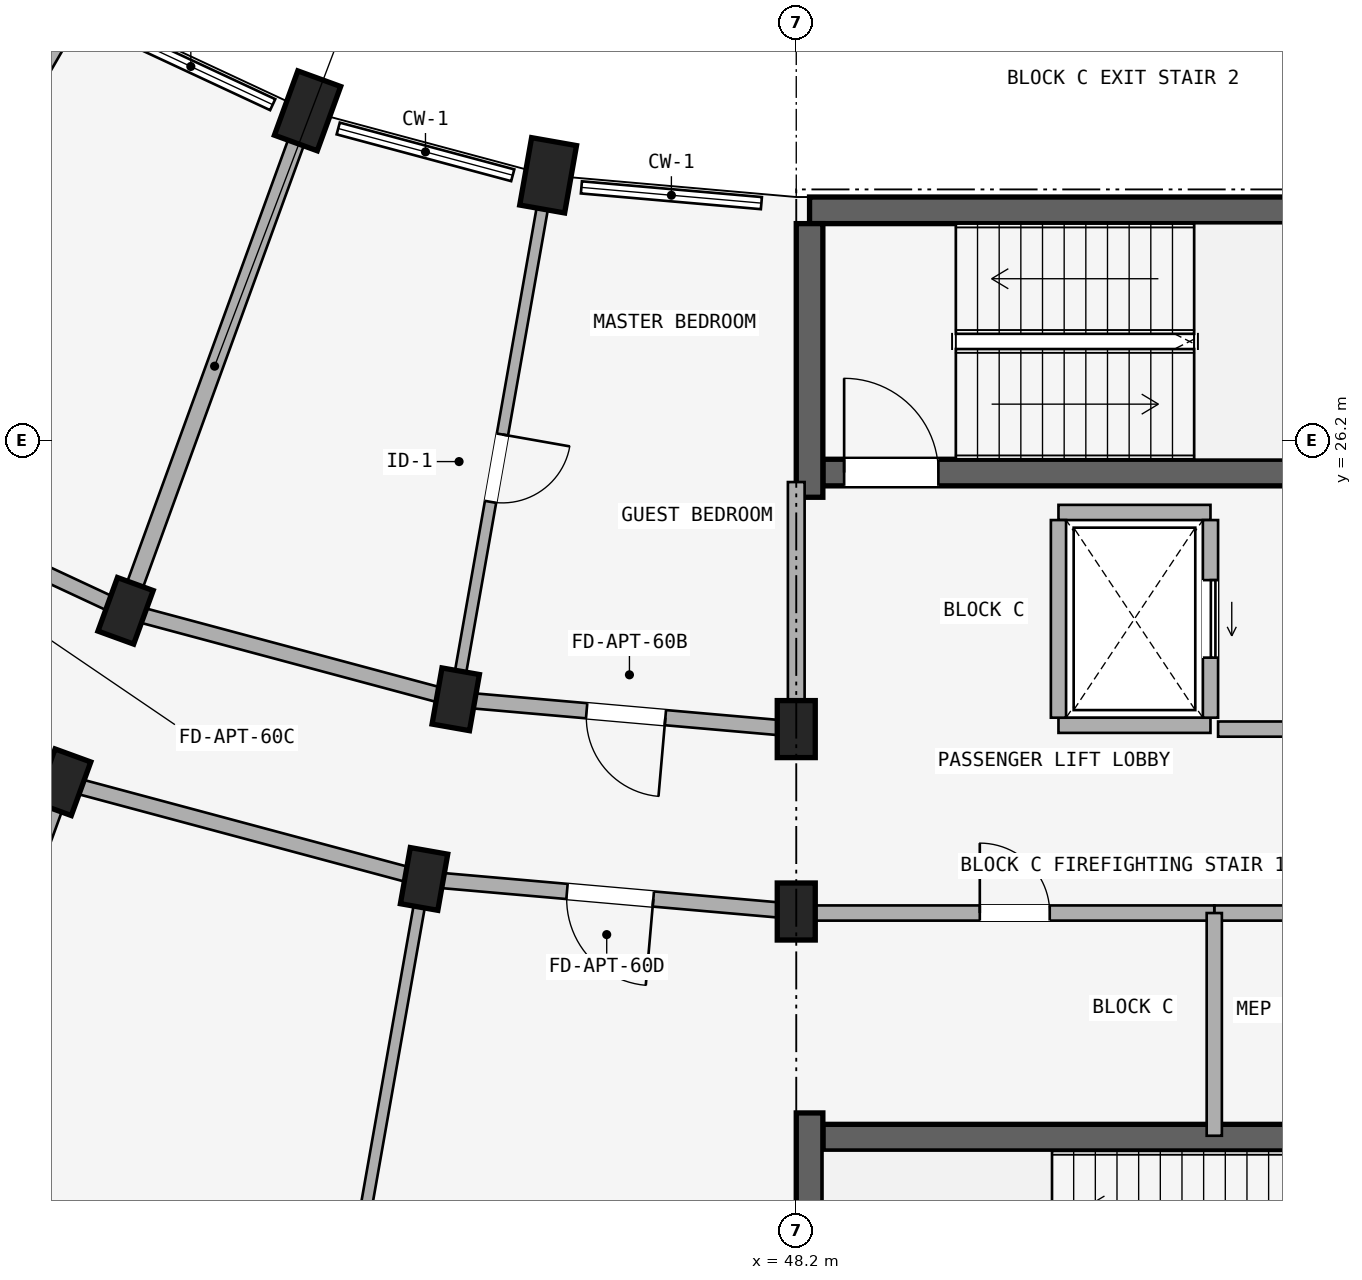
"""IFC4 building model, lengths in metres.
Left out: names, types, materials, properties, quantities, classifications, styles, units other than length and angle.
Written with IfcOpenShell. Run it as: python <this file> out.ifc"""

import sys

from ifc_helpers import new_model, si_unit, direction, frame, frame_2d, origin, origin_2d, place, context, subcontext, project, spatial, rectangle, extrude, element, fill, save


model = new_model("IFC4")
c1 = context("Model", 3, precision=1e-05, world=origin(), true_north=direction((0.0, 1.0)))
c2 = subcontext(c1, "Body", "Model", "MODEL_VIEW")
j1 = project(units=[si_unit("LENGTHUNIT", "METRE"), si_unit("PLANEANGLEUNIT", "RADIAN")], contexts=[c1])
p1 = place(None, origin())
s1 = spatial("IfcSite", under=j1, at=p1, CompositionType="ELEMENT")
p2 = place(p1, origin())
s2 = spatial("IfcBuilding", under=s1, at=p2, CompositionType="ELEMENT")
p3 = place(p2, frame((0.0, 0.0, 4.5)))
s3 = spatial("IfcBuildingStorey", under=s2, at=p3, CompositionType="ELEMENT", Elevation=4.5)
p4 = place(p3, frame((48.55, 17.025, 0.0), z_axis=(0.0, 0.0, 1.0), x_axis=(1.0, 0.0, 0.0)))
e1 = element("IfcWall", 1, at=p4, inside=s3, PredefinedType="SHEAR", context=c2, shape_type="SweptSolid", body=[
    extrude(rectangle(XDim=8.075, YDim=0.35, at=frame_2d((4.038, 0.0))), origin(), (0.0, 0.0, 1.0), 3.98),
])
p5 = place(p4, frame((6.38, 0.0, 0.0)))
e2 = element("IfcOpeningElement", 2, at=p5, cuts=e1, PredefinedType="OPENING", context=c2, shape_type="SweptSolid", body=[
    extrude(rectangle(XDim=1.24, YDim=2.15, at=frame_2d((0.62, 1.075))), frame((0.0, 0.185, 0.0), z_axis=(0.0, -1.0, 0.0), x_axis=(1.0, 0.0, 0.0)), (0.0, 0.0, 1.0), 0.37),
])
p6 = place(p3, frame((48.375, 17.35, 0.0), z_axis=(0.0, 0.0, 1.0), x_axis=(0.0, -1.0, 0.0)))
e3 = element("IfcWall", 3, at=p6, inside=s3, PredefinedType="SHEAR", context=c2, shape_type="SweptSolid", body=[
    extrude(rectangle(XDim=3.6, YDim=0.35, at=frame_2d((1.8, 0.0))), origin(), (0.0, 0.0, 1.0), 3.98),
])
p7 = place(p3, frame((48.375, 29.225, 0.0), z_axis=(0.0, 0.0, 1.0), x_axis=(1.0, 0.0, 0.0)))
e4 = element("IfcWall", 4, at=p7, inside=s3, PredefinedType="SHEAR", context=c2, shape_type="SweptSolid", body=[
    extrude(rectangle(XDim=8.25, YDim=0.35, at=frame_2d((4.125, 0.0))), origin(), (0.0, 0.0, 1.0), 3.98),
])
p8 = place(p3, frame((48.55, 25.775, 0.0), z_axis=(0.0, 0.0, 1.0), x_axis=(1.0, 0.0, 0.0)))
e5 = element("IfcWall", 5, at=p8, inside=s3, PredefinedType="SHEAR", context=c2, shape_type="SweptSolid", body=[
    extrude(rectangle(XDim=7.9, YDim=0.35, at=frame_2d((3.95, 0.0))), origin(), (0.0, 0.0, 1.0), 3.98),
])
p9 = place(p8, frame((0.28, 0.0, 0.0)))
e6 = element("IfcOpeningElement", 6, at=p9, cuts=e5, PredefinedType="OPENING", context=c2, shape_type="SweptSolid", body=[
    extrude(rectangle(XDim=1.24, YDim=2.15, at=frame_2d((0.62, 1.075))), frame((0.0, 0.185, 0.0), z_axis=(0.0, -1.0, 0.0), x_axis=(1.0, 0.0, 0.0)), (0.0, 0.0, 1.0), 0.37),
])
p10 = place(p3, frame((48.375, 29.05, 0.0), z_axis=(0.0, 0.0, 1.0), x_axis=(0.0, -1.0, 0.0)))
e7 = element("IfcWall", 7, at=p10, inside=s3, PredefinedType="SHEAR", context=c2, shape_type="SweptSolid", body=[
    extrude(rectangle(XDim=3.6, YDim=0.35, at=frame_2d((1.8, 0.0))), origin(), (0.0, 0.0, 1.0), 3.98),
])
for number, where, z_axis, x_axis in (
    (8, (48.2, 22.4, 0.0), (0.0, 0.0, 1.0), (1.0, 0.0, 0.0)),
    (9, (48.2, 20.0, 0.0), (0.0, 0.0, 1.0), (1.0, 0.0, 0.0)),
):
    element("IfcColumn", number, at=place(p3, frame(where, z_axis=z_axis, x_axis=x_axis)), inside=s3, PredefinedType="COLUMN", context=c2, shape_type="SweptSolid", body=[
        extrude(rectangle(XDim=0.5, YDim=0.75, at=origin_2d()), origin(), (0.0, 0.0, 1.0), 3.98),
    ])
p11 = place(p3, frame((44.935, 29.686, 0.0), z_axis=(0.0, 0.0, 1.0), x_axis=(-0.984807753012, 0.173648177667, 0.0)))
e10 = element("IfcColumn", 10, at=p11, inside=s3, PredefinedType="COLUMN", context=c2, shape_type="SweptSolid", body=[
    extrude(rectangle(XDim=0.6, YDim=0.9, at=origin_2d()), origin(), (0.0, 0.0, 1.0), 3.98),
])
for number, where, z_axis, x_axis in (
    (11, (43.72, 22.792, 0.0), (0.0, 0.0, 1.0), (-0.985, 0.174, 0.0)),
    (12, (43.303, 20.428, 0.0), (0.0, 0.0, 1.0), (-0.985, 0.174, 0.0)),
):
    element("IfcColumn", number, at=place(p3, frame(where, z_axis=z_axis, x_axis=x_axis)), inside=s3, PredefinedType="COLUMN", context=c2, shape_type="SweptSolid", body=[
        extrude(rectangle(XDim=0.5, YDim=0.75, at=origin_2d()), origin(), (0.0, 0.0, 1.0), 3.98),
    ])
p12 = place(p3, frame((41.77, 30.534, 0.0), z_axis=(0.0, 0.0, 1.0), x_axis=(-0.939692620786, 0.342020143326, 0.0)))
e13 = element("IfcColumn", 13, at=p12, inside=s3, PredefinedType="COLUMN", context=c2, shape_type="SweptSolid", body=[
    extrude(rectangle(XDim=0.6, YDim=0.9, at=origin_2d()), origin(), (0.0, 0.0, 1.0), 3.98),
])
for number, where, z_axis, x_axis in (
    (14, (39.376, 23.956, 0.0), (0.0, 0.0, 1.0), (-0.94, 0.342, 0.0)),
    (15, (38.555, 21.701, 0.0), (0.0, 0.0, 1.0), (-0.94, 0.342, 0.0)),
):
    element("IfcColumn", number, at=place(p3, frame(where, z_axis=z_axis, x_axis=x_axis)), inside=s3, PredefinedType="COLUMN", context=c2, shape_type="SweptSolid", body=[
        extrude(rectangle(XDim=0.5, YDim=0.75, at=origin_2d()), origin(), (0.0, 0.0, 1.0), 3.98),
    ])
p13 = place(p3, frame((53.7, 19.98, 0.0), z_axis=(0.0, 0.0, 1.0), x_axis=(1.0, 0.0, 0.0)))
e16 = element("IfcWall", 16, at=p13, inside=s3, PredefinedType="STANDARD", context=c2, shape_type="SweptSolid", body=[
    extrude(rectangle(XDim=5.65, YDim=0.2, at=frame_2d((2.825, 0.0))), origin(), (0.0, 0.0, 1.0), 3.322),
])
p14 = place(p13, frame((1.923, 0.0, 0.0)))
e17 = element("IfcOpeningElement", 17, at=p14, cuts=e16, PredefinedType="OPENING", context=c2, shape_type="SweptSolid", body=[
    extrude(rectangle(XDim=1.24, YDim=2.15, at=frame_2d((0.62, 1.075))), frame((0.0, 0.11, 0.0), z_axis=(0.0, -1.0, 0.0), x_axis=(1.0, 0.0, 0.0)), (0.0, 0.0, 1.0), 0.22),
])
p15 = place(p3, frame((48.45, 19.98, 0.0), z_axis=(0.0, 0.0, 1.0), x_axis=(1.0, 0.0, 0.0)))
e18 = element("IfcWall", 18, at=p15, inside=s3, PredefinedType="STANDARD", context=c2, shape_type="SweptSolid", body=[
    extrude(rectangle(XDim=5.25, YDim=0.2, at=frame_2d((2.625, 0.0))), origin(), (0.0, 0.0, 1.0), 3.322),
])
p16 = place(p15, frame((2.165, 0.0, 0.0)))
e19 = element("IfcOpeningElement", 19, at=p16, cuts=e18, PredefinedType="OPENING", context=c2, shape_type="SweptSolid", body=[
    extrude(rectangle(XDim=0.92, YDim=2.1, at=frame_2d((0.46, 1.05))), frame((0.0, 0.11, 0.0), z_axis=(0.0, -1.0, 0.0), x_axis=(1.0, 0.0, 0.0)), (0.0, 0.0, 1.0), 0.22),
])
p17 = place(p3, frame((53.7, 19.98, 0.0), z_axis=(0.0, 0.0, 1.0), x_axis=(0.0, -1.0, 0.0)))
e20 = element("IfcWall", 20, at=p17, inside=s3, PredefinedType="STANDARD", context=c2, shape_type="SweptSolid", body=[
    extrude(rectangle(XDim=2.93, YDim=0.2, at=frame_2d((1.465, 0.0))), origin(), (0.0, 0.0, 1.0), 3.322),
])
p18 = place(p3, frame((51.65, 25.25, 0.0), z_axis=(0.0, 0.0, 1.0), x_axis=(1.0, 0.0, 0.0)))
e21 = element("IfcWall", 21, at=p18, inside=s3, PredefinedType="STANDARD", context=c2, shape_type="SweptSolid", body=[
    extrude(rectangle(XDim=2.0, YDim=0.2, at=frame_2d((1.0, 0.0))), origin(), (0.0, 0.0, 1.0), 3.98),
])
p19 = place(p3, frame((51.65, 22.45, 0.0), z_axis=(0.0, 0.0, 1.0), x_axis=(1.0, 0.0, 0.0)))
e22 = element("IfcWall", 22, at=p19, inside=s3, PredefinedType="STANDARD", context=c2, shape_type="SweptSolid", body=[
    extrude(rectangle(XDim=2.0, YDim=0.2, at=frame_2d((1.0, 0.0))), origin(), (0.0, 0.0, 1.0), 3.322),
])
p20 = place(p3, frame((51.65, 25.15, 0.0), z_axis=(0.0, 0.0, 1.0), x_axis=(0.0, -1.0, 0.0)))
e23 = element("IfcWall", 23, at=p20, inside=s3, PredefinedType="STANDARD", context=c2, shape_type="SweptSolid", body=[
    extrude(rectangle(XDim=2.6, YDim=0.2, at=frame_2d((1.3, 0.0))), origin(), (0.0, 0.0, 1.0), 3.322),
])
p21 = place(p3, frame((53.65, 25.15, 0.0), z_axis=(0.0, 0.0, 1.0), x_axis=(0.0, -1.0, 0.0)))
e24 = element("IfcWall", 24, at=p21, inside=s3, PredefinedType="STANDARD", context=c2, shape_type="SweptSolid", body=[
    extrude(rectangle(XDim=2.6, YDim=0.2, at=frame_2d((1.3, 0.0))), origin(), (0.0, 0.0, 1.0), 3.322),
])
p22 = place(p21, frame((0.79, 0.0, 0.0)))
e25 = element("IfcOpeningElement", 25, at=p22, cuts=e24, PredefinedType="OPENING", context=c2, shape_type="SweptSolid", body=[
    extrude(rectangle(XDim=1.02, YDim=2.15, at=frame_2d((0.51, 1.075))), frame((0.0, 0.11, 0.0), z_axis=(0.0, -1.0, 0.0), x_axis=(1.0, 0.0, 0.0)), (0.0, 0.0, 1.0), 0.22),
])
p23 = place(p3, frame((53.75, 22.4, 0.0), z_axis=(0.0, 0.0, 1.0), x_axis=(1.0, 0.0, 0.0)))
e26 = element("IfcWall", 26, at=p23, inside=s3, PredefinedType="STANDARD", context=c2, shape_type="SweptSolid", body=[
    extrude(rectangle(XDim=5.6, YDim=0.2, at=frame_2d((2.8, 0.0))), origin(), (0.0, 0.0, 1.0), 3.322),
])
p24 = place(p23, frame((1.91, 0.0, 0.0)))
e27 = element("IfcOpeningElement", 27, at=p24, cuts=e26, PredefinedType="OPENING", context=c2, shape_type="SweptSolid", body=[
    extrude(rectangle(XDim=1.22, YDim=2.15, at=frame_2d((0.61, 1.075))), frame((0.0, 0.11, 0.0), z_axis=(0.0, -1.0, 0.0), x_axis=(1.0, 0.0, 0.0)), (0.0, 0.0, 1.0), 0.22),
])
p25 = place(p3, frame((48.2, 22.4, 0.0), z_axis=(0.0, 0.0, 1.0), x_axis=(-0.996191949488, 0.087187153726, 0.0)))
e28 = element("IfcWall", 28, at=p25, inside=s3, PredefinedType="STANDARD", context=c2, shape_type="SweptSolid", body=[
    extrude(rectangle(XDim=4.497, YDim=0.2, at=frame_2d((2.249, 0.0))), origin(), (0.0, 0.0, 1.0), 3.322),
])
p26 = place(p25, frame((1.729, 0.0, 0.0)))
e29 = element("IfcOpeningElement", 29, at=p26, cuts=e28, PredefinedType="OPENING", context=c2, shape_type="SweptSolid", body=[
    extrude(rectangle(XDim=1.04, YDim=2.15, at=frame_2d((0.52, 1.075))), frame((0.0, 0.11, 0.0), z_axis=(0.0, -1.0, 0.0), x_axis=(1.0, 0.0, 0.0)), (0.0, 0.0, 1.0), 0.22),
])
p27 = place(p3, frame((48.2, 20.0, 0.0), z_axis=(0.0, 0.0, 1.0), x_axis=(-0.996193663584, 0.087167566415, 0.0)))
e30 = element("IfcWall", 30, at=p27, inside=s3, PredefinedType="STANDARD", context=c2, shape_type="SweptSolid", body=[
    extrude(rectangle(XDim=4.916, YDim=0.2, at=frame_2d((2.458, 0.0))), origin(), (0.0, 0.0, 1.0), 3.322),
])
p28 = place(p27, frame((1.888, 0.0, 0.0)))
e31 = element("IfcOpeningElement", 31, at=p28, cuts=e30, PredefinedType="OPENING", context=c2, shape_type="SweptSolid", body=[
    extrude(rectangle(XDim=1.14, YDim=2.15, at=frame_2d((0.57, 1.075))), frame((0.0, 0.11, 0.0), z_axis=(0.0, -1.0, 0.0), x_axis=(1.0, 0.0, 0.0)), (0.0, 0.0, 1.0), 0.22),
])
p29 = place(p3, frame((43.72, 22.792, 0.0), z_axis=(0.0, 0.0, 1.0), x_axis=(-0.965934240054, 0.258787642463, 0.0)))
e32 = element("IfcWall", 32, at=p29, inside=s3, PredefinedType="STANDARD", context=c2, shape_type="SweptSolid", body=[
    extrude(rectangle(XDim=4.497, YDim=0.2, at=frame_2d((2.249, 0.0))), origin(), (0.0, 0.0, 1.0), 3.322),
])
p30 = place(p3, frame((43.303, 20.428, 0.0), z_axis=(0.0, 0.0, 1.0), x_axis=(-0.965930095386, 0.258803112091, 0.0)))
e33 = element("IfcWall", 33, at=p30, inside=s3, PredefinedType="STANDARD", context=c2, shape_type="SweptSolid", body=[
    extrude(rectangle(XDim=4.916, YDim=0.2, at=frame_2d((2.458, 0.0))), origin(), (0.0, 0.0, 1.0), 3.322),
])
p31 = place(p3, frame((39.376, 23.956, 0.0), z_axis=(0.0, 0.0, 1.0), x_axis=(-0.906307919131, 0.422617978463, 0.0)))
e34 = element("IfcWall", 34, at=p31, inside=s3, PredefinedType="STANDARD", context=c2, shape_type="SweptSolid", body=[
    extrude(rectangle(XDim=4.497, YDim=0.2, at=frame_2d((2.249, 0.0))), origin(), (0.0, 0.0, 1.0), 3.322),
])
p32 = place(p31, frame((1.709, 0.0, 0.0)))
e35 = element("IfcOpeningElement", 35, at=p32, cuts=e34, PredefinedType="OPENING", context=c2, shape_type="SweptSolid", body=[
    extrude(rectangle(XDim=1.08, YDim=2.15, at=frame_2d((0.54, 1.075))), frame((0.0, 0.11, 0.0), z_axis=(0.0, -1.0, 0.0), x_axis=(1.0, 0.0, 0.0)), (0.0, 0.0, 1.0), 0.22),
])
p33 = place(p3, frame((38.555, 21.701, 0.0), z_axis=(0.0, 0.0, 1.0), x_axis=(-0.906302381024, 0.422629854778, 0.0)))
e36 = element("IfcWall", 36, at=p33, inside=s3, PredefinedType="STANDARD", context=c2, shape_type="SweptSolid", body=[
    extrude(rectangle(XDim=4.915, YDim=0.2, at=frame_2d((2.458, 0.0))), origin(), (0.0, 0.0, 1.0), 3.322),
])
p34 = place(p33, frame((1.958, 0.0, 0.0)))
e37 = element("IfcOpeningElement", 37, at=p34, cuts=e36, PredefinedType="OPENING", context=c2, shape_type="SweptSolid", body=[
    extrude(rectangle(XDim=1.0, YDim=2.15, at=frame_2d((0.5, 1.075))), frame((0.0, 0.11, 0.0), z_axis=(0.0, -1.0, 0.0), x_axis=(1.0, 0.0, 0.0)), (0.0, 0.0, 1.0), 0.22),
])
p35 = place(p3, frame((48.2, 25.65, 0.0), z_axis=(0.0, 0.0, 1.0), x_axis=(0.0, -1.0, 0.0)))
e38 = element("IfcWall", 38, at=p35, inside=s3, PredefinedType="STANDARD", context=c2, shape_type="SweptSolid", body=[
    extrude(rectangle(XDim=3.2, YDim=0.22, at=frame_2d((1.6, 0.0))), origin(), (0.0, 0.0, 1.0), 3.322),
])
p36 = place(p3, frame((44.901, 29.489, 0.0), z_axis=(0.0, 0.0, 1.0), x_axis=(-0.173647089161, -0.984807944945, 0.0)))
e39 = element("IfcWall", 39, at=p36, inside=s3, PredefinedType="PARTITIONING", context=c2, shape_type="SweptSolid", body=[
    extrude(rectangle(XDim=6.75, YDim=0.15, at=frame_2d((3.375, 0.0))), origin(), (0.0, 0.0, 1.0), 3.322),
])
p37 = place(p36, frame((3.262, 0.0, 0.0)))
e40 = element("IfcOpeningElement", 40, at=p37, cuts=e39, PredefinedType="OPENING", context=c2, shape_type="SweptSolid", body=[
    extrude(rectangle(XDim=0.9, YDim=2.1, at=frame_2d((0.45, 1.05))), frame((0.0, 0.085, 0.0), z_axis=(0.0, -1.0, 0.0), x_axis=(1.0, 0.0, 0.0)), (0.0, 0.0, 1.0), 0.17),
])
p38 = place(p3, frame((43.286, 20.33, 0.0), z_axis=(0.0, 0.0, 1.0), x_axis=(-0.173646216546, -0.984808098809, 0.0)))
e41 = element("IfcWall", 41, at=p38, inside=s3, PredefinedType="PARTITIONING", context=c2, shape_type="SweptSolid", body=[
    extrude(rectangle(XDim=17.42, YDim=0.15, at=frame_2d((8.71, 0.0))), origin(), (0.0, 0.0, 1.0), 3.322),
])
p39 = place(p38, frame((7.5, 0.0, 0.0)))
e42 = element("IfcOpeningElement", 42, at=p39, cuts=e41, PredefinedType="OPENING", context=c2, shape_type="SweptSolid", body=[
    extrude(rectangle(XDim=0.8, YDim=2.1, at=frame_2d((0.4, 1.05))), frame((0.0, 0.085, 0.0), z_axis=(0.0, -1.0, 0.0), x_axis=(1.0, 0.0, 0.0)), (0.0, 0.0, 1.0), 0.17),
])
p40 = place(p3, frame((41.702, 30.346, 0.0), z_axis=(0.0, 0.0, 1.0), x_axis=(-0.342010221662, -0.939696231917, 0.0)))
e43 = element("IfcWall", 43, at=p40, inside=s3, PredefinedType="STANDARD", context=c2, shape_type="SweptSolid", body=[
    extrude(rectangle(XDim=6.75, YDim=0.22, at=frame_2d((3.375, 0.0))), origin(), (0.0, 0.0, 1.0), 3.322),
])
p41 = place(p3, frame((38.521, 21.607, 0.0), z_axis=(0.0, 0.0, 1.0), x_axis=(-0.342022120477, -0.939691901159, 0.0)))
e44 = element("IfcWall", 44, at=p41, inside=s3, PredefinedType="STANDARD", context=c2, shape_type="SweptSolid", body=[
    extrude(rectangle(XDim=17.42, YDim=0.23, at=frame_2d((8.71, 0.0))), origin(), (0.0, 0.0, 1.0), 3.322),
])
p42 = place(p3, frame((38.7, 31.746, 0.0), z_axis=(0.0, 0.0, 1.0), x_axis=(-0.499997969693, -0.866026575979, 0.0)))
e45 = element("IfcWall", 45, at=p42, inside=s3, PredefinedType="PARTITIONING", context=c2, shape_type="SweptSolid", body=[
    extrude(rectangle(XDim=6.75, YDim=0.15, at=frame_2d((3.375, 0.0))), origin(), (0.0, 0.0, 1.0), 3.322),
])
p43 = place(p42, frame((3.222, 0.0, 0.0)))
e46 = element("IfcOpeningElement", 46, at=p43, cuts=e45, PredefinedType="OPENING", context=c2, shape_type="SweptSolid", body=[
    extrude(rectangle(XDim=0.98, YDim=2.12, at=frame_2d((0.49, 1.06))), frame((0.0, 0.085, 0.0), z_axis=(0.0, -1.0, 0.0), x_axis=(1.0, 0.0, 0.0)), (0.0, 0.0, 1.0), 0.17),
])
p44 = place(p16, frame((0.92, 0.0, 0.0), z_axis=(0.0, 0.0, 1.0), x_axis=(-1.0, 0.0, 0.0)))
e47 = element("IfcDoor", 47, at=p44, inside=s3, OperationType="SINGLE_SWING_RIGHT", PredefinedType="DOOR", context=c2, shape_type="SweptSolid", body=[
    extrude(rectangle(XDim=0.92, YDim=2.1, at=frame_2d((0.46, 1.05))), frame((0.0, 0.025, 0.0), z_axis=(0.0, -1.0, 0.0), x_axis=(1.0, 0.0, 0.0)), (0.0, 0.0, 1.0), 0.05),
])
fill(e19, e47)
p45 = place(p9, origin())
e48 = element("IfcDoor", 48, at=p45, inside=s3, OperationType="SINGLE_SWING_LEFT", PredefinedType="DOOR", context=c2, shape_type="SweptSolid", body=[
    extrude(rectangle(XDim=1.24, YDim=2.15, at=frame_2d((0.62, 1.075))), frame((0.0, 0.025, 0.0), z_axis=(0.0, -1.0, 0.0), x_axis=(1.0, 0.0, 0.0)), (0.0, 0.0, 1.0), 0.05),
])
fill(e6, e48)
p46 = place(p22, origin())
e49 = element("IfcDoor", 49, at=p46, inside=s3, OperationType="SLIDING_TO_RIGHT", PredefinedType="DOOR", context=c2, shape_type="SweptSolid", body=[
    extrude(rectangle(XDim=1.02, YDim=2.15, at=frame_2d((0.51, 1.075))), frame((0.0, 0.025, 0.0), z_axis=(0.0, -1.0, 0.0), x_axis=(1.0, 0.0, 0.0)), (0.0, 0.0, 1.0), 0.05),
])
fill(e25, e49)
p47 = place(p37, origin())
e50 = element("IfcDoor", 50, at=p47, inside=s3, OperationType="SINGLE_SWING_LEFT", PredefinedType="DOOR", context=c2, shape_type="SweptSolid", body=[
    extrude(rectangle(XDim=0.9, YDim=2.1, at=frame_2d((0.45, 1.05))), frame((0.0, 0.025, 0.0), z_axis=(0.0, -1.0, 0.0), x_axis=(1.0, 0.0, 0.0)), (0.0, 0.0, 1.0), 0.05),
])
fill(e40, e50)
p48 = place(p28, frame((1.14, 0.0, 0.0), z_axis=(0.0, 0.0, 1.0), x_axis=(-1.0, 0.0, 0.0)))
e51 = element("IfcDoor", 51, at=p48, inside=s3, OperationType="SINGLE_SWING_RIGHT", PredefinedType="DOOR", context=c2, shape_type="SweptSolid", body=[
    extrude(rectangle(XDim=1.14, YDim=2.15, at=frame_2d((0.57, 1.075))), frame((0.0, 0.025, 0.0), z_axis=(0.0, -1.0, 0.0), x_axis=(1.0, 0.0, 0.0)), (0.0, 0.0, 1.0), 0.05),
])
fill(e31, e51)
p49 = place(p26, origin())
e52 = element("IfcDoor", 52, at=p49, inside=s3, OperationType="SINGLE_SWING_LEFT", PredefinedType="DOOR", context=c2, shape_type="SweptSolid", body=[
    extrude(rectangle(XDim=1.04, YDim=2.15, at=frame_2d((0.52, 1.075))), frame((0.0, 0.025, 0.0), z_axis=(0.0, -1.0, 0.0), x_axis=(1.0, 0.0, 0.0)), (0.0, 0.0, 1.0), 0.05),
])
fill(e29, e52)
save(model, sys.argv[1])
